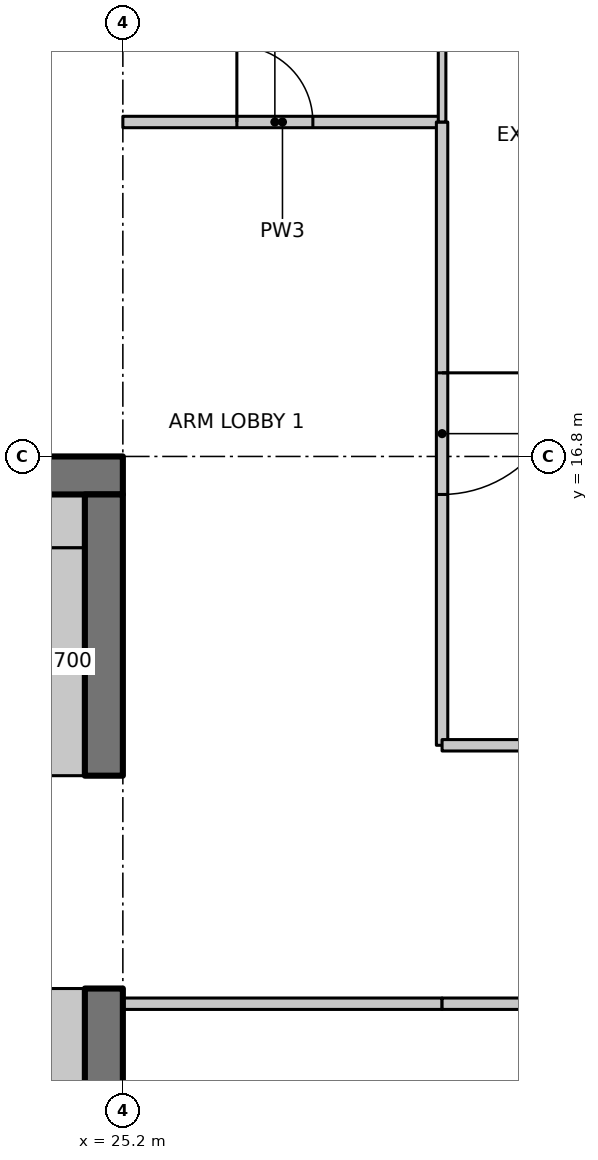
"""IFC4 building model, lengths in metres.
Left out: names, types, materials, properties, quantities, classifications, styles, units other than length and angle.
Written with IfcOpenShell. Run it as: python <this file> out.ifc"""

import sys

from ifc_helpers import new_model, si_unit, direction, frame, frame_2d, origin, place, context, subcontext, project, spatial, polyline, rectangle, outline, extrude, element, fill, save


model = new_model("IFC4")
c1 = context("Model", 3, precision=1e-05, world=origin(), true_north=direction((0.0, 1.0)))
c2 = subcontext(c1, "Body", "Model", "MODEL_VIEW")
j1 = project(units=[si_unit("LENGTHUNIT", "METRE"), si_unit("PLANEANGLEUNIT", "RADIAN")], contexts=[c1])
p1 = place(None, origin())
s1 = spatial("IfcSite", under=j1, at=p1, CompositionType="ELEMENT")
p2 = place(p1, origin())
s2 = spatial("IfcBuilding", under=s1, at=p2, CompositionType="ELEMENT")
p3 = place(p2, frame((0.0, 0.0, 230.1)))
s3 = spatial("IfcBuildingStorey", under=s2, at=p3, CompositionType="ELEMENT", Elevation=230.1)
p4 = place(p3, frame((23.8, 16.55, 0.0), z_axis=(0.0, 0.0, 1.0), x_axis=(1.0, 0.0, 0.0)))
e1 = element("IfcWall", 1, at=p4, inside=s3, PredefinedType="SHEAR", context=c2, shape_type="SweptSolid", body=[
    extrude(rectangle(XDim=1.4, YDim=0.5, at=frame_2d((0.7, 0.0))), origin(), (0.0, 0.0, 1.0), 3.35),
])
p5 = place(p3, frame((24.95, 0.5, 0.0), z_axis=(0.0, 0.0, 1.0), x_axis=(0.0, 1.0, 0.0)))
e2 = element("IfcWall", 2, at=p5, inside=s3, PredefinedType="SHEAR", context=c2, shape_type="SweptSolid", body=[
    extrude(rectangle(XDim=9.3, YDim=0.5, at=frame_2d((4.65, 0.0))), origin(), (0.0, 0.0, 1.0), 3.35),
])
p6 = place(p3, frame((24.95, 12.6, 0.0), z_axis=(0.0, 0.0, 1.0), x_axis=(0.0, 1.0, 0.0)))
e3 = element("IfcWall", 3, at=p6, inside=s3, PredefinedType="SHEAR", context=c2, shape_type="SweptSolid", body=[
    extrude(rectangle(XDim=3.7, YDim=0.5, at=frame_2d((1.85, 0.0))), origin(), (0.0, 0.0, 1.0), 3.35),
])
p7 = place(p3, frame((24.35, 12.6, 0.0), z_axis=(0.0, 0.0, 1.0), x_axis=(0.0, 1.0, 0.0)))
e4 = element("IfcWall", 4, at=p7, inside=s3, PredefinedType="PARTITIONING", context=c2, shape_type="SweptSolid", body=[
    extrude(rectangle(XDim=3.0, YDim=0.7, at=frame_2d((1.5, 0.0))), origin(), (0.0, 0.0, 1.0), 3.35),
])
p8 = place(p3, frame((23.8, 15.95, 0.0), z_axis=(0.0, 0.0, 1.0), x_axis=(1.0, 0.0, 0.0)))
e5 = element("IfcWall", 5, at=p8, inside=s3, PredefinedType="PARTITIONING", context=c2, shape_type="SweptSolid", body=[
    extrude(rectangle(XDim=0.9, YDim=0.7, at=frame_2d((0.45, 0.0))), origin(), (0.0, 0.0, 1.0), 3.35),
])
p9 = place(p3, frame((24.35, 4.35, 0.0), z_axis=(0.0, 0.0, 1.0), x_axis=(0.0, 1.0, 0.0)))
e6 = element("IfcWall", 6, at=p9, inside=s3, PredefinedType="PARTITIONING", context=c2, shape_type="SweptSolid", body=[
    extrude(rectangle(XDim=5.45, YDim=0.7, at=frame_2d((2.725, 0.0))), origin(), (0.0, 0.0, 1.0), 3.35),
])
p10 = place(p3, frame((25.2, 21.2, 0.0), z_axis=(0.0, 0.0, 1.0), x_axis=(1.0, 0.0, 0.0)))
e7 = element("IfcWall", 7, at=p10, inside=s3, PredefinedType="PARTITIONING", context=c2, shape_type="SweptSolid", body=[
    extrude(rectangle(XDim=4.2, YDim=0.15, at=frame_2d((2.1, 0.0))), origin(), (0.0, 0.0, 1.0), 3.33),
])
p11 = place(p10, frame((1.5, 0.0, 0.0)))
e8 = element("IfcOpeningElement", 8, at=p11, cuts=e7, PredefinedType="OPENING", context=c2, shape_type="SweptSolid", body=[
    extrude(rectangle(XDim=1.0, YDim=2.1, at=frame_2d((0.5, 1.05))), frame((0.0, 0.085, 0.0), z_axis=(0.0, -1.0, 0.0), x_axis=(1.0, 0.0, 0.0)), (0.0, 0.0, 1.0), 0.17),
])
p12 = place(p3, frame((29.4, 9.6, 0.0), z_axis=(0.0, 0.0, 1.0), x_axis=(-1.0, 0.0, 0.0)))
e9 = element("IfcWall", 9, at=p12, inside=s3, PredefinedType="PARTITIONING", context=c2, shape_type="SweptSolid", body=[
    extrude(rectangle(XDim=4.2, YDim=0.15, at=frame_2d((2.1, 0.0))), origin(), (0.0, 0.0, 1.0), 3.33),
])
p13 = place(p3, frame((29.4, 21.2, 0.0), z_axis=(0.0, 0.0, 1.0), x_axis=(0.0, -1.0, 0.0)))
e10 = element("IfcWall", 10, at=p13, inside=s3, PredefinedType="PARTITIONING", context=c2, shape_type="SweptSolid", body=[
    extrude(rectangle(XDim=8.2, YDim=0.15, at=frame_2d((4.1, 0.0))), origin(), (0.0, 0.0, 1.0), 3.33),
])
p14 = place(p13, frame((3.3, 0.0, 0.0)))
e11 = element("IfcOpeningElement", 11, at=p14, cuts=e10, PredefinedType="OPENING", context=c2, shape_type="SweptSolid", body=[
    extrude(rectangle(XDim=1.6, YDim=2.1, at=frame_2d((0.8, 1.05))), frame((0.0, 0.085, 0.0), z_axis=(0.0, -1.0, 0.0), x_axis=(1.0, 0.0, 0.0)), (0.0, 0.0, 1.0), 0.17),
])
p15 = place(p3, frame((29.4, 27.429, 0.0), z_axis=(0.0, 0.0, 1.0), x_axis=(0.0, -1.0, 0.0)))
e12 = element("IfcWall", 12, at=p15, inside=s3, PredefinedType="PARTITIONING", context=c2, shape_type="SweptSolid", body=[
    extrude(outline(polyline([(0.0, 0.0), (6.229, 0.0), (6.229, 3.33), (2.679, 3.33), (2.677, 2.98), (1.781, 2.98), (1.779, 3.33), (0.154, 3.33), (0.0, 3.33), (0.0, 0.0)])), frame((0.0, 0.05, 0.0), z_axis=(0.0, -1.0, 0.0), x_axis=(1.0, 0.0, 0.0)), (0.0, 0.0, 1.0), 0.1),
])
p16 = place(p3, frame((33.6, 9.6, 0.0), z_axis=(0.0, 0.0, 1.0), x_axis=(-1.0, 0.0, 0.0)))
e13 = element("IfcWall", 13, at=p16, inside=s3, PredefinedType="PARTITIONING", context=c2, shape_type="SweptSolid", body=[
    extrude(rectangle(XDim=4.2, YDim=0.15, at=frame_2d((2.1, 0.0))), origin(), (0.0, 0.0, 1.0), 3.33),
])
p17 = place(p16, frame((1.2, 0.0, 0.0)))
e14 = element("IfcOpeningElement", 14, at=p17, cuts=e13, PredefinedType="OPENING", context=c2, shape_type="SweptSolid", body=[
    extrude(rectangle(XDim=1.6, YDim=2.1, at=frame_2d((0.8, 1.05))), frame((0.0, 0.085, 0.0), z_axis=(0.0, -1.0, 0.0), x_axis=(1.0, 0.0, 0.0)), (0.0, 0.0, 1.0), 0.17),
])
p18 = place(p3, frame((29.4, 13.0, 0.0), z_axis=(0.0, 0.0, 1.0), x_axis=(1.0, 0.0, 0.0)))
e15 = element("IfcWall", 15, at=p18, inside=s3, PredefinedType="PARTITIONING", context=c2, shape_type="SweptSolid", body=[
    extrude(rectangle(XDim=4.2, YDim=0.15, at=frame_2d((2.1, 0.0))), origin(), (0.0, 0.0, 1.0), 3.33),
])
p19 = place(p11, origin())
e16 = element("IfcDoor", 16, at=p19, inside=s3, OperationType="SINGLE_SWING_LEFT", PredefinedType="DOOR", context=c2, shape_type="SweptSolid", body=[
    extrude(rectangle(XDim=1.0, YDim=2.1, at=frame_2d((0.5, 1.05))), frame((0.0, 0.025, 0.0), z_axis=(0.0, -1.0, 0.0), x_axis=(1.0, 0.0, 0.0)), (0.0, 0.0, 1.0), 0.05),
])
fill(e8, e16)
p20 = place(p14, origin())
e17 = element("IfcDoor", 17, at=p20, inside=s3, OperationType="DOUBLE_DOOR_SINGLE_SWING", PredefinedType="DOOR", context=c2, shape_type="SweptSolid", body=[
    extrude(rectangle(XDim=1.6, YDim=2.1, at=frame_2d((0.8, 1.05))), frame((0.0, 0.025, 0.0), z_axis=(0.0, -1.0, 0.0), x_axis=(1.0, 0.0, 0.0)), (0.0, 0.0, 1.0), 0.05),
])
fill(e11, e17)
save(model, sys.argv[1])
